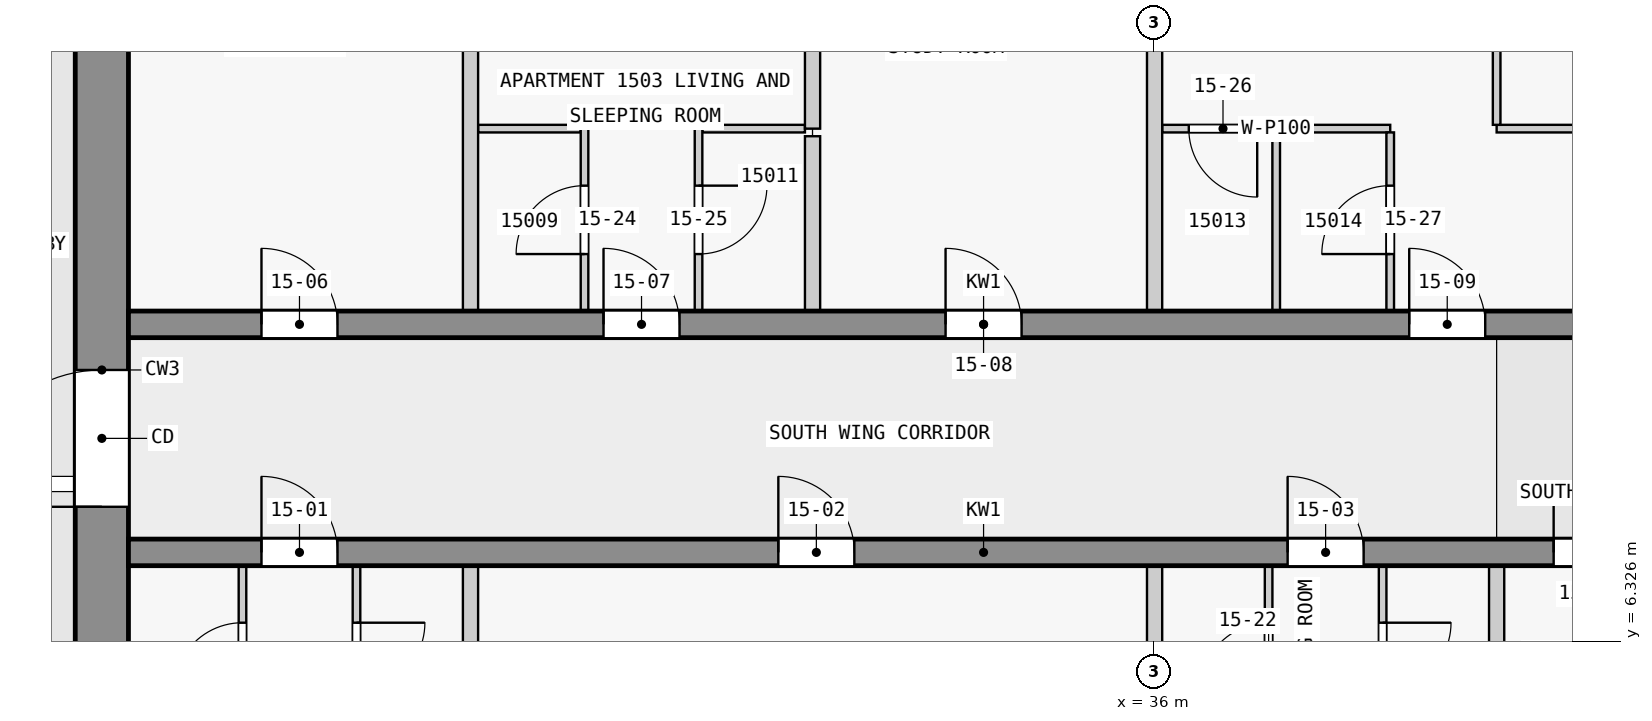
"""IFC4 building model, lengths in metres.
Left out: names, types, materials, properties, quantities, classifications, styles, units other than length and angle.
Written with IfcOpenShell. Run it as: python <this file> out.ifc"""

import sys

from ifc_helpers import new_model, si_unit, direction, frame, frame_2d, origin, place, context, subcontext, project, spatial, rectangle, extrude, element, fill, save


model = new_model("IFC4")
c1 = context("Model", 3, precision=1e-05, world=origin(), true_north=direction((0.0, 1.0)))
c2 = subcontext(c1, "Body", "Model", "MODEL_VIEW")
j1 = project(units=[si_unit("LENGTHUNIT", "METRE"), si_unit("PLANEANGLEUNIT", "RADIAN")], contexts=[c1])
p1 = place(None, origin())
s1 = spatial("IfcSite", under=j1, at=p1, CompositionType="ELEMENT")
p2 = place(p1, origin())
s2 = spatial("IfcBuilding", under=s1, at=p2, CompositionType="ELEMENT")
p3 = place(p2, frame((0.0, 0.0, 61.8)))
s3 = spatial("IfcBuildingStorey", under=s2, at=p3, CompositionType="ELEMENT", Elevation=61.8)
p4 = place(p3, frame((22.15, 2.5, 0.0), z_axis=(0.0, 0.0, 1.0), x_axis=(0.0, 1.0, 0.0)))
e1 = element("IfcWall", 1, at=p4, inside=s3, PredefinedType="SHEAR", context=c2, shape_type="SweptSolid", body=[
    extrude(rectangle(XDim=14.8, YDim=0.7, at=frame_2d((7.4, 0.0))), origin(), (0.0, 0.0, 1.0), 3.25),
])
p5 = place(p4, frame((5.6, 0.0, 0.0)))
e2 = element("IfcOpeningElement", 2, at=p5, cuts=e1, PredefinedType="OPENING", context=c2, shape_type="SweptSolid", body=[
    extrude(rectangle(XDim=1.8, YDim=2.1, at=frame_2d((0.9, 1.05))), frame((0.0, 0.36, 0.0), z_axis=(0.0, -1.0, 0.0), x_axis=(1.0, 0.0, 0.0)), (0.0, 0.0, 1.0), 0.72),
])
p6 = place(p3, frame((22.5, 7.5, 0.0), z_axis=(0.0, 0.0, 1.0), x_axis=(1.0, 0.0, 0.0)))
e3 = element("IfcWall", 3, at=p6, inside=s3, PredefinedType="SHEAR", context=c2, shape_type="SweptSolid", body=[
    extrude(rectangle(XDim=22.5, YDim=0.35, at=frame_2d((11.25, 0.0))), origin(), (0.0, 0.0, 1.0), 3.25),
])
p7 = place(p6, frame((1.75, 0.0, 0.0)))
e4 = element("IfcOpeningElement", 4, at=p7, cuts=e3, PredefinedType="OPENING", context=c2, shape_type="SweptSolid", body=[
    extrude(rectangle(XDim=1.0, YDim=2.1, at=frame_2d((0.5, 1.05))), frame((0.0, 0.185, 0.0), z_axis=(0.0, -1.0, 0.0), x_axis=(1.0, 0.0, 0.0)), (0.0, 0.0, 1.0), 0.37),
])
p8 = place(p6, frame((8.55, 0.0, 0.0)))
e5 = element("IfcOpeningElement", 5, at=p8, cuts=e3, PredefinedType="OPENING", context=c2, shape_type="SweptSolid", body=[
    extrude(rectangle(XDim=1.0, YDim=2.1, at=frame_2d((0.5, 1.05))), frame((0.0, 0.185, 0.0), z_axis=(0.0, -1.0, 0.0), x_axis=(1.0, 0.0, 0.0)), (0.0, 0.0, 1.0), 0.37),
])
p9 = place(p6, frame((15.25, 0.0, 0.0)))
e6 = element("IfcOpeningElement", 6, at=p9, cuts=e3, PredefinedType="OPENING", context=c2, shape_type="SweptSolid", body=[
    extrude(rectangle(XDim=1.0, YDim=2.1, at=frame_2d((0.5, 1.05))), frame((0.0, 0.185, 0.0), z_axis=(0.0, -1.0, 0.0), x_axis=(1.0, 0.0, 0.0)), (0.0, 0.0, 1.0), 0.37),
])
p10 = place(p6, frame((18.75, 0.0, 0.0)))
e7 = element("IfcOpeningElement", 7, at=p10, cuts=e3, PredefinedType="OPENING", context=c2, shape_type="SweptSolid", body=[
    extrude(rectangle(XDim=0.9, YDim=2.1, at=frame_2d((0.45, 1.05))), frame((0.0, 0.185, 0.0), z_axis=(0.0, -1.0, 0.0), x_axis=(1.0, 0.0, 0.0)), (0.0, 0.0, 1.0), 0.37),
])
p11 = place(p6, frame((20.95, 0.0, 0.0)))
e8 = element("IfcOpeningElement", 8, at=p11, cuts=e3, PredefinedType="OPENING", context=c2, shape_type="SweptSolid", body=[
    extrude(rectangle(XDim=1.0, YDim=2.1, at=frame_2d((0.5, 1.05))), frame((0.0, 0.185, 0.0), z_axis=(0.0, -1.0, 0.0), x_axis=(1.0, 0.0, 0.0)), (0.0, 0.0, 1.0), 0.37),
])
p12 = place(p3, frame((22.5, 10.5, 0.0), z_axis=(0.0, 0.0, 1.0), x_axis=(1.0, 0.0, 0.0)))
e9 = element("IfcWall", 9, at=p12, inside=s3, PredefinedType="SHEAR", context=c2, shape_type="SweptSolid", body=[
    extrude(rectangle(XDim=22.5, YDim=0.35, at=frame_2d((11.25, 0.0))), origin(), (0.0, 0.0, 1.0), 3.25),
])
p13 = place(p12, frame((1.75, 0.0, 0.0)))
e10 = element("IfcOpeningElement", 10, at=p13, cuts=e9, PredefinedType="OPENING", context=c2, shape_type="SweptSolid", body=[
    extrude(rectangle(XDim=1.0, YDim=2.1, at=frame_2d((0.5, 1.05))), frame((0.0, 0.185, 0.0), z_axis=(0.0, -1.0, 0.0), x_axis=(1.0, 0.0, 0.0)), (0.0, 0.0, 1.0), 0.37),
])
p14 = place(p12, frame((6.25, 0.0, 0.0)))
e11 = element("IfcOpeningElement", 11, at=p14, cuts=e9, PredefinedType="OPENING", context=c2, shape_type="SweptSolid", body=[
    extrude(rectangle(XDim=1.0, YDim=2.1, at=frame_2d((0.5, 1.05))), frame((0.0, 0.185, 0.0), z_axis=(0.0, -1.0, 0.0), x_axis=(1.0, 0.0, 0.0)), (0.0, 0.0, 1.0), 0.37),
])
p15 = place(p12, frame((10.75, 0.0, 0.0)))
e12 = element("IfcOpeningElement", 12, at=p15, cuts=e9, PredefinedType="OPENING", context=c2, shape_type="SweptSolid", body=[
    extrude(rectangle(XDim=1.0, YDim=2.1, at=frame_2d((0.5, 1.05))), frame((0.0, 0.185, 0.0), z_axis=(0.0, -1.0, 0.0), x_axis=(1.0, 0.0, 0.0)), (0.0, 0.0, 1.0), 0.37),
])
p16 = place(p12, frame((16.85, 0.0, 0.0)))
e13 = element("IfcOpeningElement", 13, at=p16, cuts=e9, PredefinedType="OPENING", context=c2, shape_type="SweptSolid", body=[
    extrude(rectangle(XDim=1.0, YDim=2.1, at=frame_2d((0.5, 1.05))), frame((0.0, 0.185, 0.0), z_axis=(0.0, -1.0, 0.0), x_axis=(1.0, 0.0, 0.0)), (0.0, 0.0, 1.0), 0.37),
])
for number, where, z_axis, x_axis in (
    (14, (28.45, 13.075, 0.0), (0.0, 0.0, 1.0), (-1.0, 0.0, 0.0)),
    (15, (31.4, 13.075, 0.0), (0.0, 0.0, 1.0), (-1.0, 0.0, 0.0)),
):
    element("IfcWall", number, at=place(p3, frame(where, z_axis=z_axis, x_axis=x_axis)), inside=s3, PredefinedType="PARTITIONING", context=c2, shape_type="SweptSolid", body=[
        extrude(rectangle(XDim=1.35, YDim=0.1, at=frame_2d((0.675, 0.0))), origin(), (0.0, 0.0, 1.0), 3.25),
    ])
p17 = place(p3, frame((39.1, 13.075, 0.0), z_axis=(0.0, 0.0, 1.0), x_axis=(-1.0, 0.0, 0.0)))
e16 = element("IfcWall", 16, at=p17, inside=s3, PredefinedType="PARTITIONING", context=c2, shape_type="SweptSolid", body=[
    extrude(rectangle(XDim=3.0, YDim=0.1, at=frame_2d((1.5, 0.0))), origin(), (0.0, 0.0, 1.0), 3.25),
])
p18 = place(p17, frame((1.75, 0.0, 0.0)))
e17 = element("IfcOpeningElement", 17, at=p18, cuts=e16, PredefinedType="OPENING", context=c2, shape_type="SweptSolid", body=[
    extrude(rectangle(XDim=0.9, YDim=2.1, at=frame_2d((0.45, 1.05))), frame((0.0, 0.06, 0.0), z_axis=(0.0, -1.0, 0.0), x_axis=(1.0, 0.0, 0.0)), (0.0, 0.0, 1.0), 0.12),
])
p19 = place(p3, frame((40.5, 13.075, 0.0), z_axis=(0.0, 0.0, 1.0), x_axis=(1.0, 0.0, 0.0)))
e18 = element("IfcWall", 18, at=p19, inside=s3, PredefinedType="PARTITIONING", context=c2, shape_type="SweptSolid", body=[
    extrude(rectangle(XDim=13.58, YDim=0.1, at=frame_2d((6.79, 0.0))), origin(), (0.0, 0.0, 1.0), 3.25),
])
p20 = place(p19, frame((1.85, 0.0, 0.0)))
e19 = element("IfcOpeningElement", 19, at=p20, cuts=e18, PredefinedType="OPENING", context=c2, shape_type="SweptSolid", body=[
    extrude(rectangle(XDim=0.9, YDim=2.1, at=frame_2d((0.45, 1.05))), frame((0.0, 0.06, 0.0), z_axis=(0.0, -1.0, 0.0), x_axis=(1.0, 0.0, 0.0)), (0.0, 0.0, 1.0), 0.12),
])
p21 = place(p19, frame((6.35, 0.0, 0.0)))
e20 = element("IfcOpeningElement", 20, at=p21, cuts=e18, PredefinedType="OPENING", context=c2, shape_type="SweptSolid", body=[
    extrude(rectangle(XDim=0.9, YDim=2.1, at=frame_2d((0.45, 1.05))), frame((0.0, 0.06, 0.0), z_axis=(0.0, -1.0, 0.0), x_axis=(1.0, 0.0, 0.0)), (0.0, 0.0, 1.0), 0.12),
])
p22 = place(p19, frame((10.75, 0.0, 0.0)))
e21 = element("IfcOpeningElement", 21, at=p22, cuts=e18, PredefinedType="OPENING", context=c2, shape_type="SweptSolid", body=[
    extrude(rectangle(XDim=0.9, YDim=2.1, at=frame_2d((0.45, 1.05))), frame((0.0, 0.06, 0.0), z_axis=(0.0, -1.0, 0.0), x_axis=(1.0, 0.0, 0.0)), (0.0, 0.0, 1.0), 0.12),
])
p23 = place(p3, frame((24.0, 4.925, 0.0), z_axis=(0.0, 0.0, 1.0), x_axis=(0.0, 1.0, 0.0)))
e22 = element("IfcWall", 22, at=p23, inside=s3, PredefinedType="PARTITIONING", context=c2, shape_type="SweptSolid", body=[
    extrude(rectangle(XDim=2.4, YDim=0.1, at=frame_2d((1.2, 0.0))), origin(), (0.0, 0.0, 1.0), 3.25),
])
p24 = place(p23, frame((0.75, 0.0, 0.0)))
e23 = element("IfcOpeningElement", 23, at=p24, cuts=e22, PredefinedType="OPENING", context=c2, shape_type="SweptSolid", body=[
    extrude(rectangle(XDim=0.9, YDim=2.1, at=frame_2d((0.45, 1.05))), frame((0.0, 0.06, 0.0), z_axis=(0.0, -1.0, 0.0), x_axis=(1.0, 0.0, 0.0)), (0.0, 0.0, 1.0), 0.12),
])
p25 = place(p3, frame((25.5, 7.325, 0.0), z_axis=(0.0, 0.0, 1.0), x_axis=(0.0, -1.0, 0.0)))
e24 = element("IfcWall", 24, at=p25, inside=s3, PredefinedType="PARTITIONING", context=c2, shape_type="SweptSolid", body=[
    extrude(rectangle(XDim=2.4, YDim=0.1, at=frame_2d((1.2, 0.0))), origin(), (0.0, 0.0, 1.0), 3.25),
])
p26 = place(p25, frame((0.75, 0.0, 0.0)))
e25 = element("IfcOpeningElement", 25, at=p26, cuts=e24, PredefinedType="OPENING", context=c2, shape_type="SweptSolid", body=[
    extrude(rectangle(XDim=0.9, YDim=2.1, at=frame_2d((0.45, 1.05))), frame((0.0, 0.06, 0.0), z_axis=(0.0, -1.0, 0.0), x_axis=(1.0, 0.0, 0.0)), (0.0, 0.0, 1.0), 0.12),
])
p27 = place(p3, frame((27.0, 5.025, 0.0), z_axis=(0.0, 0.0, 1.0), x_axis=(0.0, 1.0, 0.0)))
e26 = element("IfcWall", 26, at=p27, inside=s3, PredefinedType="PARTITIONING", context=c2, shape_type="SweptSolid", body=[
    extrude(rectangle(XDim=2.3, YDim=0.2, at=frame_2d((1.15, 0.0))), origin(), (0.0, 0.0, 1.0), 3.25),
])
p28 = place(p3, frame((27.0, 10.675, 0.0), z_axis=(0.0, 0.0, 1.0), x_axis=(0.0, 1.0, 0.0)))
e27 = element("IfcWall", 27, at=p28, inside=s3, PredefinedType="PARTITIONING", context=c2, shape_type="SweptSolid", body=[
    extrude(rectangle(XDim=5.798, YDim=0.2, at=frame_2d((2.899, 0.0))), origin(), (0.0, 0.0, 1.0), 3.25),
])
p29 = place(p3, frame((28.5, 10.675, 0.0), z_axis=(0.0, 0.0, 1.0), x_axis=(0.0, 1.0, 0.0)))
e28 = element("IfcWall", 28, at=p29, inside=s3, PredefinedType="PARTITIONING", context=c2, shape_type="SweptSolid", body=[
    extrude(rectangle(XDim=2.4, YDim=0.1, at=frame_2d((1.2, 0.0))), origin(), (0.0, 0.0, 1.0), 3.25),
])
p30 = place(p29, frame((0.75, 0.0, 0.0)))
e29 = element("IfcOpeningElement", 29, at=p30, cuts=e28, PredefinedType="OPENING", context=c2, shape_type="SweptSolid", body=[
    extrude(rectangle(XDim=0.9, YDim=2.1, at=frame_2d((0.45, 1.05))), frame((0.0, 0.06, 0.0), z_axis=(0.0, -1.0, 0.0), x_axis=(1.0, 0.0, 0.0)), (0.0, 0.0, 1.0), 0.12),
])
p31 = place(p3, frame((30.0, 13.075, 0.0), z_axis=(0.0, 0.0, 1.0), x_axis=(0.0, -1.0, 0.0)))
e30 = element("IfcWall", 30, at=p31, inside=s3, PredefinedType="PARTITIONING", context=c2, shape_type="SweptSolid", body=[
    extrude(rectangle(XDim=2.4, YDim=0.1, at=frame_2d((1.2, 0.0))), origin(), (0.0, 0.0, 1.0), 3.25),
])
p32 = place(p31, frame((0.75, 0.0, 0.0)))
e31 = element("IfcOpeningElement", 31, at=p32, cuts=e30, PredefinedType="OPENING", context=c2, shape_type="SweptSolid", body=[
    extrude(rectangle(XDim=0.9, YDim=2.1, at=frame_2d((0.45, 1.05))), frame((0.0, 0.06, 0.0), z_axis=(0.0, -1.0, 0.0), x_axis=(1.0, 0.0, 0.0)), (0.0, 0.0, 1.0), 0.12),
])
p33 = place(p3, frame((31.5, 16.878, 0.0), z_axis=(0.0, 0.0, 1.0), x_axis=(0.0, -1.0, 0.0)))
e32 = element("IfcWall", 32, at=p33, inside=s3, PredefinedType="PARTITIONING", context=c2, shape_type="SweptSolid", body=[
    extrude(rectangle(XDim=3.803, YDim=0.2, at=frame_2d((1.901, 0.0))), origin(), (0.0, 0.0, 1.0), 3.25),
])
p34 = place(p3, frame((31.5, 10.675, 0.0), z_axis=(0.0, 0.0, 1.0), x_axis=(0.0, 1.0, 0.0)))
e33 = element("IfcWall", 33, at=p34, inside=s3, PredefinedType="PARTITIONING", context=c2, shape_type="SweptSolid", body=[
    extrude(rectangle(XDim=2.3, YDim=0.2, at=frame_2d((1.15, 0.0))), origin(), (0.0, 0.0, 1.0), 3.25),
])
for number, where, z_axis, x_axis in (
    (34, (36.0, 1.4, 0.0), (0.0, 0.0, 1.0), (0.0, 1.0, 0.0)),
    (35, (36.0, 10.675, 0.0), (0.0, 0.0, 1.0), (0.0, 1.0, 0.0)),
):
    element("IfcWall", number, at=place(p3, frame(where, z_axis=z_axis, x_axis=x_axis)), inside=s3, PredefinedType="PARTITIONING", context=c2, shape_type="SweptSolid", body=[
        extrude(rectangle(XDim=5.925, YDim=0.2, at=frame_2d((2.962, 0.0))), origin(), (0.0, 0.0, 1.0), 3.25),
    ])
p35 = place(p3, frame((37.5, 4.925, 0.0), z_axis=(0.0, 0.0, 1.0), x_axis=(0.0, 1.0, 0.0)))
e36 = element("IfcWall", 36, at=p35, inside=s3, PredefinedType="PARTITIONING", context=c2, shape_type="SweptSolid", body=[
    extrude(rectangle(XDim=2.4, YDim=0.1, at=frame_2d((1.2, 0.0))), origin(), (0.0, 0.0, 1.0), 3.25),
])
p36 = place(p35, frame((0.75, 0.0, 0.0)))
e37 = element("IfcOpeningElement", 37, at=p36, cuts=e36, PredefinedType="OPENING", context=c2, shape_type="SweptSolid", body=[
    extrude(rectangle(XDim=0.9, YDim=2.1, at=frame_2d((0.45, 1.05))), frame((0.0, 0.06, 0.0), z_axis=(0.0, -1.0, 0.0), x_axis=(1.0, 0.0, 0.0)), (0.0, 0.0, 1.0), 0.12),
])
p37 = place(p3, frame((37.6, 10.675, 0.0), z_axis=(0.0, 0.0, 1.0), x_axis=(0.0, 1.0, 0.0)))
e38 = element("IfcWall", 38, at=p37, inside=s3, PredefinedType="PARTITIONING", context=c2, shape_type="SweptSolid", body=[
    extrude(rectangle(XDim=2.35, YDim=0.1, at=frame_2d((1.175, 0.0))), origin(), (0.0, 0.0, 1.0), 3.25),
])
p38 = place(p3, frame((39.0, 7.325, 0.0), z_axis=(0.0, 0.0, 1.0), x_axis=(0.0, -1.0, 0.0)))
e39 = element("IfcWall", 39, at=p38, inside=s3, PredefinedType="PARTITIONING", context=c2, shape_type="SweptSolid", body=[
    extrude(rectangle(XDim=2.4, YDim=0.1, at=frame_2d((1.2, 0.0))), origin(), (0.0, 0.0, 1.0), 3.25),
])
p39 = place(p38, frame((0.75, 0.0, 0.0)))
e40 = element("IfcOpeningElement", 40, at=p39, cuts=e39, PredefinedType="OPENING", context=c2, shape_type="SweptSolid", body=[
    extrude(rectangle(XDim=0.9, YDim=2.1, at=frame_2d((0.45, 1.05))), frame((0.0, 0.06, 0.0), z_axis=(0.0, -1.0, 0.0), x_axis=(1.0, 0.0, 0.0)), (0.0, 0.0, 1.0), 0.12),
])
p40 = place(p3, frame((39.1, 10.675, 0.0), z_axis=(0.0, 0.0, 1.0), x_axis=(0.0, 1.0, 0.0)))
e41 = element("IfcWall", 41, at=p40, inside=s3, PredefinedType="PARTITIONING", context=c2, shape_type="SweptSolid", body=[
    extrude(rectangle(XDim=2.35, YDim=0.1, at=frame_2d((1.175, 0.0))), origin(), (0.0, 0.0, 1.0), 3.25),
])
p41 = place(p40, frame((0.75, 0.0, 0.0)))
e42 = element("IfcOpeningElement", 42, at=p41, cuts=e41, PredefinedType="OPENING", context=c2, shape_type="SweptSolid", body=[
    extrude(rectangle(XDim=0.9, YDim=2.1, at=frame_2d((0.45, 1.05))), frame((0.0, 0.06, 0.0), z_axis=(0.0, -1.0, 0.0), x_axis=(1.0, 0.0, 0.0)), (0.0, 0.0, 1.0), 0.12),
])
p42 = place(p3, frame((40.5, 16.878, 0.0), z_axis=(0.0, 0.0, 1.0), x_axis=(0.0, -1.0, 0.0)))
e43 = element("IfcWall", 43, at=p42, inside=s3, PredefinedType="PARTITIONING", context=c2, shape_type="SweptSolid", body=[
    extrude(rectangle(XDim=3.753, YDim=0.1, at=frame_2d((1.876, 0.0))), origin(), (0.0, 0.0, 1.0), 3.25),
])
p43 = place(p3, frame((40.5, 5.025, 0.0), z_axis=(0.0, 0.0, 1.0), x_axis=(0.0, 1.0, 0.0)))
e44 = element("IfcWall", 44, at=p43, inside=s3, PredefinedType="PARTITIONING", context=c2, shape_type="SweptSolid", body=[
    extrude(rectangle(XDim=2.3, YDim=0.2, at=frame_2d((1.15, 0.0))), origin(), (0.0, 0.0, 1.0), 3.25),
])
p44 = place(p5, origin())
e45 = element("IfcDoor", 45, at=p44, inside=s3, OperationType="DOUBLE_DOOR_SINGLE_SWING", PredefinedType="DOOR", context=c2, shape_type="SweptSolid", body=[
    extrude(rectangle(XDim=1.8, YDim=2.1, at=frame_2d((0.9, 1.05))), frame((0.0, 0.025, 0.0), z_axis=(0.0, -1.0, 0.0), x_axis=(1.0, 0.0, 0.0)), (0.0, 0.0, 1.0), 0.05),
])
fill(e2, e45)
p45 = place(p7, origin())
e46 = element("IfcDoor", 46, at=p45, inside=s3, OperationType="SINGLE_SWING_LEFT", PredefinedType="DOOR", context=c2, shape_type="SweptSolid", body=[
    extrude(rectangle(XDim=1.0, YDim=2.1, at=frame_2d((0.5, 1.05))), frame((0.0, 0.025, 0.0), z_axis=(0.0, -1.0, 0.0), x_axis=(1.0, 0.0, 0.0)), (0.0, 0.0, 1.0), 0.05),
])
fill(e4, e46)
p46 = place(p8, origin())
e47 = element("IfcDoor", 47, at=p46, inside=s3, OperationType="SINGLE_SWING_LEFT", PredefinedType="DOOR", context=c2, shape_type="SweptSolid", body=[
    extrude(rectangle(XDim=1.0, YDim=2.1, at=frame_2d((0.5, 1.05))), frame((0.0, 0.025, 0.0), z_axis=(0.0, -1.0, 0.0), x_axis=(1.0, 0.0, 0.0)), (0.0, 0.0, 1.0), 0.05),
])
fill(e5, e47)
p47 = place(p9, origin())
e48 = element("IfcDoor", 48, at=p47, inside=s3, OperationType="SINGLE_SWING_RIGHT", PredefinedType="DOOR", context=c2, shape_type="SweptSolid", body=[
    extrude(rectangle(XDim=1.0, YDim=2.1, at=frame_2d((0.5, 1.05))), frame((0.0, 0.025, 0.0), z_axis=(0.0, -1.0, 0.0), x_axis=(1.0, 0.0, 0.0)), (0.0, 0.0, 1.0), 0.05),
])
fill(e6, e48)
p48 = place(p10, origin())
e49 = element("IfcDoor", 49, at=p48, inside=s3, OperationType="SINGLE_SWING_RIGHT", PredefinedType="DOOR", context=c2, shape_type="SweptSolid", body=[
    extrude(rectangle(XDim=0.9, YDim=2.1, at=frame_2d((0.45, 1.05))), frame((0.0, 0.025, 0.0), z_axis=(0.0, -1.0, 0.0), x_axis=(1.0, 0.0, 0.0)), (0.0, 0.0, 1.0), 0.05),
])
fill(e7, e49)
p49 = place(p13, origin())
e50 = element("IfcDoor", 50, at=p49, inside=s3, OperationType="SINGLE_SWING_LEFT", PredefinedType="DOOR", context=c2, shape_type="SweptSolid", body=[
    extrude(rectangle(XDim=1.0, YDim=2.1, at=frame_2d((0.5, 1.05))), frame((0.0, 0.025, 0.0), z_axis=(0.0, -1.0, 0.0), x_axis=(1.0, 0.0, 0.0)), (0.0, 0.0, 1.0), 0.05),
])
fill(e10, e50)
p50 = place(p14, origin())
e51 = element("IfcDoor", 51, at=p50, inside=s3, OperationType="SINGLE_SWING_LEFT", PredefinedType="DOOR", context=c2, shape_type="SweptSolid", body=[
    extrude(rectangle(XDim=1.0, YDim=2.1, at=frame_2d((0.5, 1.05))), frame((0.0, 0.025, 0.0), z_axis=(0.0, -1.0, 0.0), x_axis=(1.0, 0.0, 0.0)), (0.0, 0.0, 1.0), 0.05),
])
fill(e11, e51)
p51 = place(p15, origin())
e52 = element("IfcDoor", 52, at=p51, inside=s3, OperationType="SINGLE_SWING_LEFT", PredefinedType="DOOR", context=c2, shape_type="SweptSolid", body=[
    extrude(rectangle(XDim=1.0, YDim=2.1, at=frame_2d((0.5, 1.05))), frame((0.0, 0.025, 0.0), z_axis=(0.0, -1.0, 0.0), x_axis=(1.0, 0.0, 0.0)), (0.0, 0.0, 1.0), 0.05),
])
fill(e12, e52)
p52 = place(p16, origin())
e53 = element("IfcDoor", 53, at=p52, inside=s3, OperationType="SINGLE_SWING_RIGHT", PredefinedType="DOOR", context=c2, shape_type="SweptSolid", body=[
    extrude(rectangle(XDim=1.0, YDim=2.1, at=frame_2d((0.5, 1.05))), frame((0.0, 0.025, 0.0), z_axis=(0.0, -1.0, 0.0), x_axis=(1.0, 0.0, 0.0)), (0.0, 0.0, 1.0), 0.05),
])
fill(e13, e53)
p53 = place(p24, origin())
e54 = element("IfcDoor", 54, at=p53, inside=s3, OperationType="SINGLE_SWING_LEFT", PredefinedType="DOOR", context=c2, shape_type="SweptSolid", body=[
    extrude(rectangle(XDim=0.9, YDim=2.1, at=frame_2d((0.45, 1.05))), frame((0.0, 0.025, 0.0), z_axis=(0.0, -1.0, 0.0), x_axis=(1.0, 0.0, 0.0)), (0.0, 0.0, 1.0), 0.05),
])
fill(e23, e54)
p54 = place(p26, origin())
e55 = element("IfcDoor", 55, at=p54, inside=s3, OperationType="SINGLE_SWING_LEFT", PredefinedType="DOOR", context=c2, shape_type="SweptSolid", body=[
    extrude(rectangle(XDim=0.9, YDim=2.1, at=frame_2d((0.45, 1.05))), frame((0.0, 0.025, 0.0), z_axis=(0.0, -1.0, 0.0), x_axis=(1.0, 0.0, 0.0)), (0.0, 0.0, 1.0), 0.05),
])
fill(e25, e55)
p55 = place(p36, origin())
e56 = element("IfcDoor", 56, at=p55, inside=s3, OperationType="SINGLE_SWING_LEFT", PredefinedType="DOOR", context=c2, shape_type="SweptSolid", body=[
    extrude(rectangle(XDim=0.9, YDim=2.1, at=frame_2d((0.45, 1.05))), frame((0.0, 0.025, 0.0), z_axis=(0.0, -1.0, 0.0), x_axis=(1.0, 0.0, 0.0)), (0.0, 0.0, 1.0), 0.05),
])
fill(e37, e56)
p56 = place(p39, origin())
e57 = element("IfcDoor", 57, at=p56, inside=s3, OperationType="SINGLE_SWING_LEFT", PredefinedType="DOOR", context=c2, shape_type="SweptSolid", body=[
    extrude(rectangle(XDim=0.9, YDim=2.1, at=frame_2d((0.45, 1.05))), frame((0.0, 0.025, 0.0), z_axis=(0.0, -1.0, 0.0), x_axis=(1.0, 0.0, 0.0)), (0.0, 0.0, 1.0), 0.05),
])
fill(e40, e57)
p57 = place(p30, origin())
e58 = element("IfcDoor", 58, at=p57, inside=s3, OperationType="SINGLE_SWING_RIGHT", PredefinedType="DOOR", context=c2, shape_type="SweptSolid", body=[
    extrude(rectangle(XDim=0.9, YDim=2.1, at=frame_2d((0.45, 1.05))), frame((0.0, 0.025, 0.0), z_axis=(0.0, -1.0, 0.0), x_axis=(1.0, 0.0, 0.0)), (0.0, 0.0, 1.0), 0.05),
])
fill(e29, e58)
p58 = place(p32, origin())
e59 = element("IfcDoor", 59, at=p58, inside=s3, OperationType="SINGLE_SWING_RIGHT", PredefinedType="DOOR", context=c2, shape_type="SweptSolid", body=[
    extrude(rectangle(XDim=0.9, YDim=2.1, at=frame_2d((0.45, 1.05))), frame((0.0, 0.025, 0.0), z_axis=(0.0, -1.0, 0.0), x_axis=(1.0, 0.0, 0.0)), (0.0, 0.0, 1.0), 0.05),
])
fill(e31, e59)
p59 = place(p18, origin())
e60 = element("IfcDoor", 60, at=p59, inside=s3, OperationType="SINGLE_SWING_RIGHT", PredefinedType="DOOR", context=c2, shape_type="SweptSolid", body=[
    extrude(rectangle(XDim=0.9, YDim=2.1, at=frame_2d((0.45, 1.05))), frame((0.0, 0.025, 0.0), z_axis=(0.0, -1.0, 0.0), x_axis=(1.0, 0.0, 0.0)), (0.0, 0.0, 1.0), 0.05),
])
fill(e17, e60)
p60 = place(p41, origin())
e61 = element("IfcDoor", 61, at=p60, inside=s3, OperationType="SINGLE_SWING_RIGHT", PredefinedType="DOOR", context=c2, shape_type="SweptSolid", body=[
    extrude(rectangle(XDim=0.9, YDim=2.1, at=frame_2d((0.45, 1.05))), frame((0.0, 0.025, 0.0), z_axis=(0.0, -1.0, 0.0), x_axis=(1.0, 0.0, 0.0)), (0.0, 0.0, 1.0), 0.05),
])
fill(e42, e61)
save(model, sys.argv[1])
